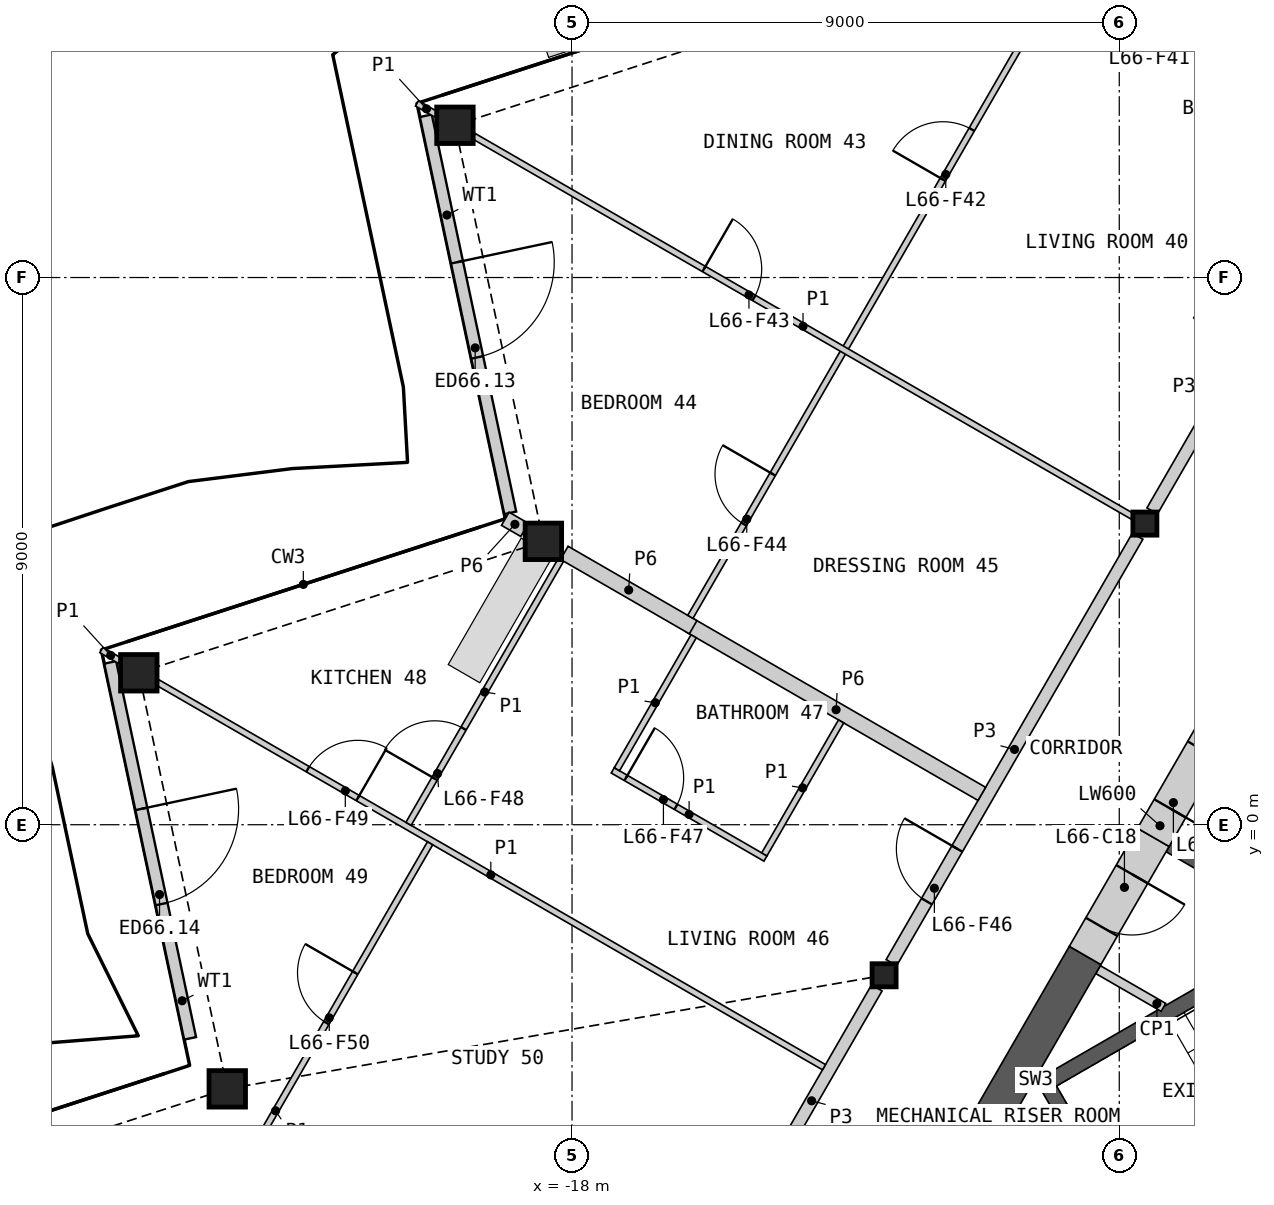
"""IFC4 building model, lengths in metres.
Left out: names, types, materials, properties, quantities, classifications, styles, units other than length and angle.
Written with IfcOpenShell. Run it as: python <this file> out.ifc"""

import sys

from ifc_helpers import new_model, si_unit, direction, frame, frame_2d, origin, origin_2d, place, context, subcontext, project, spatial, polyline, rectangle, hollow_rectangle, i_section, outline, extrude, element, fill, save


model = new_model("IFC4")
c1 = context("Model", 3, precision=1e-05, world=origin(), true_north=direction((0.0, 1.0)))
c2 = subcontext(c1, "Body", "Model", "MODEL_VIEW")
j1 = project(units=[si_unit("LENGTHUNIT", "METRE"), si_unit("PLANEANGLEUNIT", "RADIAN")], contexts=[c1])
p1 = place(None, origin())
s1 = spatial("IfcSite", under=j1, at=p1, CompositionType="ELEMENT")
p2 = place(p1, origin())
s2 = spatial("IfcBuilding", under=s1, at=p2, CompositionType="ELEMENT")
p3 = place(p2, frame((0.0, 0.0, 305.2)))
s3 = spatial("IfcBuildingStorey", under=s2, at=p3, CompositionType="ELEMENT", Elevation=305.2)
for number, where, z_axis, x_axis in (
    (1, (-19.926, 11.504, 0.0), (0.0, 0.0, 1.0), (1.0, 0.0, 0.0)),
    (2, (-18.471, 4.661, 0.0), (0.0, 0.0, 1.0), (1.0, 0.0, 0.0)),
    (3, (-25.125, 2.499, 0.0), (0.0, 0.0, 1.0), (1.0, 0.0, 0.0)),
    (4, (-23.67, -4.344, 0.0), (0.0, 0.0, 1.0), (1.0, 0.0, 0.0)),
):
    element("IfcColumn", number, at=place(p3, frame(where, z_axis=z_axis, x_axis=x_axis)), inside=s3, PredefinedType="COLUMN", context=c2, shape_type="SweptSolid", body=[
        extrude(hollow_rectangle(XDim=0.6, YDim=0.6, WallThickness=0.04, at=origin_2d()), origin(), (0.0, 0.0, 1.0), 3.4),
    ])
for number, where, z_axis, x_axis in (
    (5, (-8.578, 4.953, 0.0), (0.0, 0.0, 1.0), (1.0, 0.0, 0.0)),
    (6, (-12.868, -2.476, 0.0), (0.0, 0.0, 1.0), (1.0, 0.0, 0.0)),
):
    element("IfcColumn", number, at=place(p3, frame(where, z_axis=z_axis, x_axis=x_axis)), inside=s3, PredefinedType="COLUMN", context=c2, shape_type="SweptSolid", body=[
        extrude(i_section(OverallWidth=0.396, OverallDepth=0.381, WebThickness=0.019, FlangeThickness=0.03, at=origin_2d()), origin(), (0.0, 0.0, 1.0), 3.4),
    ])
p4 = place(p3, frame((-20.404, 11.661, 0.0), z_axis=(0.0, 0.0, 1.0), x_axis=(0.207893301034, -0.978151509422, 0.0)))
e7 = element("IfcWall", 7, at=p4, inside=s3, PredefinedType="SOLIDWALL", context=c2, shape_type="SweptSolid", body=[
    extrude(rectangle(XDim=6.677, YDim=0.2, at=frame_2d((3.339, 0.0))), origin(), (0.0, 0.0, 1.0), 2.488),
])
p5 = place(p4, frame((2.463, 0.0, 0.0)))
e8 = element("IfcOpeningElement", 8, at=p5, cuts=e7, PredefinedType="OPENING", context=c2, shape_type="SweptSolid", body=[
    extrude(rectangle(XDim=1.6, YDim=2.25, at=frame_2d((0.8, 1.125))), frame((0.0, 0.11, 0.0), z_axis=(0.0, -1.0, 0.0), x_axis=(1.0, 0.0, 0.0)), (0.0, 0.0, 1.0), 0.22),
])
p6 = place(p3, frame((-25.595, 2.67, 0.0), z_axis=(0.0, 0.0, 1.0), x_axis=(0.207888316408, -0.978152568826, 0.0)))
e9 = element("IfcWall", 9, at=p6, inside=s3, PredefinedType="SOLIDWALL", context=c2, shape_type="SweptSolid", body=[
    extrude(rectangle(XDim=6.322, YDim=0.2, at=frame_2d((3.161, 0.0))), origin(), (0.0, 0.0, 1.0), 2.488),
])
p7 = place(p6, frame((2.463, 0.0, 0.0)))
e10 = element("IfcOpeningElement", 10, at=p7, cuts=e9, PredefinedType="OPENING", context=c2, shape_type="SweptSolid", body=[
    extrude(rectangle(XDim=1.6, YDim=2.25, at=frame_2d((0.8, 1.125))), frame((0.0, 0.11, 0.0), z_axis=(0.0, -1.0, 0.0), x_axis=(1.0, 0.0, 0.0)), (0.0, 0.0, 1.0), 0.22),
])
p8 = place(p3, origin())
e11 = element("IfcWall", 11, at=p8, inside=s3, PredefinedType="SHEAR", context=c2, shape_type="SweptSolid", body=[
    extrude(outline(polyline([(-6.061, -1.697), (-8.231, -0.444), (-8.131, -0.271), (-5.96, -1.524), (-6.061, -1.697)])), origin(), (0.0, 0.0, 1.0), 3.1),
])
p9 = place(p3, origin())
e12 = element("IfcWall", 12, at=p9, inside=s3, PredefinedType="SHEAR", context=c2, shape_type="SweptSolid", body=[
    extrude(outline(polyline([(-5.307, -1.281), (-10.374, -4.206), (-10.032, -4.298), (-5.182, -1.498), (-5.307, -1.281)])), origin(), (0.0, 0.0, 1.0), 3.1),
])
p10 = place(p3, origin())
e13 = element("IfcWall", 13, at=p10, inside=s3, PredefinedType="SHEAR", context=c2, shape_type="SweptSolid", body=[
    extrude(outline(polyline([(-10.374, -4.206), (-8.83, -6.881), (-8.738, -6.539), (-10.032, -4.298), (-10.374, -4.206)])), origin(), (0.0, 0.0, 1.0), 3.1),
])
p11 = place(p3, origin())
e14 = element("IfcWall", 14, at=p11, inside=s3, PredefinedType="SHEAR", context=c2, shape_type="SweptSolid", body=[
    extrude(outline(polyline([(-8.738, -6.539), (-8.83, -6.881), (-3.763, -3.956), (-3.888, -3.739), (-8.738, -6.539)])), origin(), (0.0, 0.0, 1.0), 3.1),
])
p12 = place(p3, frame((-9.35, -2.383, 0.0), z_axis=(0.0, 0.0, 1.0), x_axis=(0.866057962423, -0.499943602543, 0.0)))
e15 = element("IfcWall", 15, at=p12, inside=s3, PredefinedType="PARTITIONING", context=c2, shape_type="SweptSolid", body=[
    extrude(rectangle(XDim=1.242, YDim=0.15, at=frame_2d((0.621, 0.0))), origin(), (0.0, 0.0, 1.0), 3.1),
])
p13 = place(p3, frame((-9.562, -2.15, 0.0), z_axis=(0.0, 0.0, 1.0), x_axis=(-0.500015214976, -0.866016619236, 0.0)))
e16 = element("IfcWall", 16, at=p13, inside=s3, PredefinedType="SHEAR", context=c2, shape_type="SweptSolid", body=[
    extrude(rectangle(XDim=5.318, YDim=0.6, at=frame_2d((2.659, 0.0))), origin(), (0.0, 0.0, 1.0), 3.1),
])
p14 = place(p3, frame((-8.44, -0.208, 0.0), z_axis=(0.0, 0.0, 1.0), x_axis=(-0.500001951578, -0.866024277037, 0.0)))
e17 = element("IfcWall", 17, at=p14, inside=s3, PredefinedType="SHEAR", context=c2, shape_type="SweptSolid", body=[
    extrude(rectangle(XDim=2.243, YDim=0.6, at=frame_2d((1.122, 0.0))), origin(), (0.0, 0.0, 1.0), 3.1),
])
p15 = place(p14, frame((0.7, 0.0, 0.0)))
e18 = element("IfcOpeningElement", 18, at=p15, cuts=e17, PredefinedType="OPENING", context=c2, shape_type="SweptSolid", body=[
    extrude(rectangle(XDim=1.0, YDim=2.1, at=frame_2d((0.5, 1.05))), frame((0.0, 0.31, 0.0), z_axis=(0.0, -1.0, 0.0), x_axis=(1.0, 0.0, 0.0)), (0.0, 0.0, 1.0), 0.62),
])
p16 = place(p3, frame((-7.34, 1.698, 0.0), z_axis=(0.0, 0.0, 1.0), x_axis=(-0.50002983664, -0.866008176907, 0.0)))
e19 = element("IfcWall", 19, at=p16, inside=s3, PredefinedType="SHEAR", context=c2, shape_type="SweptSolid", body=[
    extrude(rectangle(XDim=2.2, YDim=0.6, at=frame_2d((1.1, 0.0))), origin(), (0.0, 0.0, 1.0), 3.1),
])
p17 = place(p16, frame((0.55, 0.0, 0.0)))
e20 = element("IfcOpeningElement", 20, at=p17, cuts=e19, PredefinedType="OPENING", context=c2, shape_type="SweptSolid", body=[
    extrude(rectangle(XDim=1.1, YDim=2.1, at=frame_2d((0.55, 1.05))), frame((0.0, 0.31, 0.0), z_axis=(0.0, -1.0, 0.0), x_axis=(1.0, 0.0, 0.0)), (0.0, 0.0, 1.0), 0.62),
])
p18 = place(p3, frame((-8.458, 5.16, 0.0), z_axis=(0.0, 0.0, 1.0), x_axis=(0.499984266882, 0.866034487114, 0.0)))
e21 = element("IfcWall", 21, at=p18, inside=s3, PredefinedType="PARTITIONING", context=c2, shape_type="SweptSolid", body=[
    extrude(rectangle(XDim=8.099, YDim=0.2, at=frame_2d((4.049, 0.0))), origin(), (0.0, 0.0, 1.0), 3.1),
])
p19 = place(p18, frame((3.093, 0.0, 0.0)))
e22 = element("IfcOpeningElement", 22, at=p19, cuts=e21, PredefinedType="OPENING", context=c2, shape_type="SweptSolid", body=[
    extrude(rectangle(XDim=1.0, YDim=2.1, at=frame_2d((0.5, 1.05))), frame((0.0, 0.11, 0.0), z_axis=(0.0, -1.0, 0.0), x_axis=(1.0, 0.0, 0.0)), (0.0, 0.0, 1.0), 0.22),
])
p20 = place(p3, frame((-12.748, -2.269, 0.0), z_axis=(0.0, 0.0, 1.0), x_axis=(0.499984266882, 0.866034487114, 0.0)))
e23 = element("IfcWall", 23, at=p20, inside=s3, PredefinedType="PARTITIONING", context=c2, shape_type="SweptSolid", body=[
    extrude(rectangle(XDim=8.099, YDim=0.2, at=frame_2d((4.049, 0.0))), origin(), (0.0, 0.0, 1.0), 3.1),
])
p21 = place(p20, frame((1.164, 0.0, 0.0)))
e24 = element("IfcOpeningElement", 24, at=p21, cuts=e23, PredefinedType="OPENING", context=c2, shape_type="SweptSolid", body=[
    extrude(rectangle(XDim=1.0, YDim=2.1, at=frame_2d((0.5, 1.05))), frame((0.0, 0.11, 0.0), z_axis=(0.0, -1.0, 0.0), x_axis=(1.0, 0.0, 0.0)), (0.0, 0.0, 1.0), 0.22),
])
p22 = place(p3, frame((-16.054, 3.275, 0.0), z_axis=(0.0, 0.0, 1.0), x_axis=(0.866019581949, -0.500010083578, 0.0)))
e25 = element("IfcWall", 25, at=p22, inside=s3, PredefinedType="PARTITIONING", context=c2, shape_type="SweptSolid", body=[
    extrude(rectangle(XDim=5.535, YDim=0.25, at=frame_2d((2.768, 0.0))), origin(), (0.0, 0.0, 1.0), 2.33),
])
p23 = place(p3, frame((-15.131, -6.397, 0.0), z_axis=(0.0, 0.0, 1.0), x_axis=(0.500003406062, 0.866023437285, 0.0)))
e26 = element("IfcWall", 26, at=p23, inside=s3, PredefinedType="PARTITIONING", context=c2, shape_type="SweptSolid", body=[
    extrude(rectangle(XDim=4.288, YDim=0.2, at=frame_2d((2.144, 0.0))), origin(), (0.0, 0.0, 1.0), 3.1),
])
p24 = place(p3, frame((-18.127, 4.472, 0.0), z_axis=(0.0, 0.0, 1.0), x_axis=(0.866017755388, -0.500013247177, 0.0)))
e27 = element("IfcWall", 27, at=p24, inside=s3, PredefinedType="PARTITIONING", context=c2, shape_type="SweptSolid", body=[
    extrude(rectangle(XDim=2.447, YDim=0.25, at=frame_2d((1.223, 0.0))), origin(), (0.0, 0.0, 1.0), 2.33),
])
p25 = place(p3, frame((-19.097, 5.032, 0.0), z_axis=(0.0, 0.0, 1.0), x_axis=(0.86609656662, -0.499876722092, 0.0)))
e28 = element("IfcWall", 28, at=p25, inside=s3, PredefinedType="PARTITIONING", context=c2, shape_type="SweptSolid", body=[
    extrude(rectangle(XDim=0.365, YDim=0.25, at=frame_2d((0.183, 0.0))), origin(), (0.0, 0.0, 1.0), 2.33),
])
p26 = place(p3, frame((-16.054, 3.419, 0.0), z_axis=(0.0, 0.0, 1.0), x_axis=(0.499999256795, 0.866025832873, 0.0)))
e29 = element("IfcWall", 29, at=p26, inside=s3, PredefinedType="PARTITIONING", context=c2, shape_type="SweptSolid", body=[
    extrude(rectangle(XDim=15.448, YDim=0.1, at=frame_2d((7.724, 0.0))), origin(), (0.0, 0.0, 1.0), 2.33),
])
p27 = place(p26, frame((8.306, 0.0, 0.0)))
e30 = element("IfcOpeningElement", 30, at=p27, cuts=e29, PredefinedType="OPENING", context=c2, shape_type="SweptSolid", body=[
    extrude(rectangle(XDim=0.95, YDim=2.1, at=frame_2d((0.475, 1.05))), frame((0.0, 0.06, 0.0), z_axis=(0.0, -1.0, 0.0), x_axis=(1.0, 0.0, 0.0)), (0.0, 0.0, 1.0), 0.12),
])
p28 = place(p26, frame((1.76, 0.0, 0.0)))
e31 = element("IfcOpeningElement", 31, at=p28, cuts=e29, PredefinedType="OPENING", context=c2, shape_type="SweptSolid", body=[
    extrude(rectangle(XDim=0.95, YDim=2.1, at=frame_2d((0.475, 1.05))), frame((0.0, 0.06, 0.0), z_axis=(0.0, -1.0, 0.0), x_axis=(1.0, 0.0, 0.0)), (0.0, 0.0, 1.0), 0.12),
])
p29 = place(p3, frame((-24.815, 2.339, 0.0), z_axis=(0.0, 0.0, 1.0), x_axis=(0.866021406514, -0.500006923412, 0.0)))
e32 = element("IfcWall", 32, at=p29, inside=s3, PredefinedType="PARTITIONING", context=c2, shape_type="SweptSolid", body=[
    extrude(rectangle(XDim=12.654, YDim=0.1, at=frame_2d((6.327, 0.0))), origin(), (0.0, 0.0, 1.0), 2.33),
])
p30 = place(p29, frame((2.851, 0.0, 0.0)))
e33 = element("IfcOpeningElement", 33, at=p30, cuts=e32, PredefinedType="OPENING", context=c2, shape_type="SweptSolid", body=[
    extrude(rectangle(XDim=0.95, YDim=2.1, at=frame_2d((0.475, 1.05))), frame((0.0, 0.06, 0.0), z_axis=(0.0, -1.0, 0.0), x_axis=(1.0, 0.0, 0.0)), (0.0, 0.0, 1.0), 0.12),
])
p31 = place(p3, frame((-19.615, 11.325, 0.0), z_axis=(0.0, 0.0, 1.0), x_axis=(0.86602139559, -0.500006942333, 0.0)))
e34 = element("IfcWall", 34, at=p31, inside=s3, PredefinedType="PARTITIONING", context=c2, shape_type="SweptSolid", body=[
    extrude(rectangle(XDim=12.505, YDim=0.1, at=frame_2d((6.252, 0.0))), origin(), (0.0, 0.0, 1.0), 2.33),
])
p32 = place(p31, frame((4.37, 0.0, 0.0)))
e35 = element("IfcOpeningElement", 35, at=p32, cuts=e34, PredefinedType="OPENING", context=c2, shape_type="SweptSolid", body=[
    extrude(rectangle(XDim=0.95, YDim=2.1, at=frame_2d((0.475, 1.05))), frame((0.0, 0.06, 0.0), z_axis=(0.0, -1.0, 0.0), x_axis=(1.0, 0.0, 0.0)), (0.0, 0.0, 1.0), 0.12),
])
p33 = place(p3, frame((-23.722, -6.172, 0.0), z_axis=(0.0, 0.0, 1.0), x_axis=(0.499991774685, 0.86603015262, 0.0)))
e36 = element("IfcWall", 36, at=p33, inside=s3, PredefinedType="PARTITIONING", context=c2, shape_type="SweptSolid", body=[
    extrude(rectangle(XDim=6.774, YDim=0.1, at=frame_2d((3.387, 0.0))), origin(), (0.0, 0.0, 1.0), 2.33),
])
p34 = place(p33, frame((3.364, 0.0, 0.0)))
e37 = element("IfcOpeningElement", 37, at=p34, cuts=e36, PredefinedType="OPENING", context=c2, shape_type="SweptSolid", body=[
    extrude(rectangle(XDim=0.95, YDim=2.1, at=frame_2d((0.475, 1.05))), frame((0.0, 0.06, 0.0), z_axis=(0.0, -1.0, 0.0), x_axis=(1.0, 0.0, 0.0)), (0.0, 0.0, 1.0), 0.12),
])
p35 = place(p3, frame((-9.787, 14.174, 0.0), z_axis=(0.0, 0.0, 1.0), x_axis=(0.866031222068, -0.499989922303, 0.0)))
e38 = element("IfcWall", 38, at=p35, inside=s3, PredefinedType="PARTITIONING", context=c2, shape_type="SweptSolid", body=[
    extrude(rectangle(XDim=5.557, YDim=0.1, at=frame_2d((2.779, 0.0))), origin(), (0.0, 0.0, 1.0), 2.33),
])
p36 = place(p35, frame((1.853, 0.0, 0.0)))
e39 = element("IfcOpeningElement", 39, at=p36, cuts=e38, PredefinedType="OPENING", context=c2, shape_type="SweptSolid", body=[
    extrude(rectangle(XDim=0.95, YDim=2.1, at=frame_2d((0.475, 1.05))), frame((0.0, 0.06, 0.0), z_axis=(0.0, -1.0, 0.0), x_axis=(1.0, 0.0, 0.0)), (0.0, 0.0, 1.0), 0.12),
])
p37 = place(p3, frame((-20.689, 0.014, 0.0), z_axis=(0.0, 0.0, 1.0), x_axis=(0.500003822013, 0.866023197133, 0.0)))
e40 = element("IfcWall", 40, at=p37, inside=s3, PredefinedType="PARTITIONING", context=c2, shape_type="SweptSolid", body=[
    extrude(rectangle(XDim=5.007, YDim=0.1, at=frame_2d((2.504, 0.0))), origin(), (0.0, 0.0, 1.0), 2.33),
])
p38 = place(p37, frame((0.86, 0.0, 0.0)))
e41 = element("IfcOpeningElement", 41, at=p38, cuts=e40, PredefinedType="OPENING", context=c2, shape_type="SweptSolid", body=[
    extrude(rectangle(XDim=0.95, YDim=2.1, at=frame_2d((0.475, 1.05))), frame((0.0, 0.06, 0.0), z_axis=(0.0, -1.0, 0.0), x_axis=(1.0, 0.0, 0.0)), (0.0, 0.0, 1.0), 0.12),
])
p39 = place(p3, frame((-17.33, 0.894, 0.0), z_axis=(0.0, 0.0, 1.0), x_axis=(0.866032775405, -0.499987231761, 0.0)))
e42 = element("IfcWall", 42, at=p39, inside=s3, PredefinedType="PARTITIONING", context=c2, shape_type="SweptSolid", body=[
    extrude(rectangle(XDim=2.9, YDim=0.1, at=frame_2d((1.45, 0.0))), origin(), (0.0, 0.0, 1.0), 2.33),
])
p40 = place(p39, frame((0.25, 0.0, 0.0)))
e43 = element("IfcOpeningElement", 43, at=p40, cuts=e42, PredefinedType="OPENING", context=c2, shape_type="SweptSolid", body=[
    extrude(rectangle(XDim=0.95, YDim=2.1, at=frame_2d((0.475, 1.05))), frame((0.0, 0.06, 0.0), z_axis=(0.0, -1.0, 0.0), x_axis=(1.0, 0.0, 0.0)), (0.0, 0.0, 1.0), 0.12),
])
p41 = place(p3, frame((-14.837, -0.488, 0.0), z_axis=(0.0, 0.0, 1.0), x_axis=(0.499976333282, 0.866039067339, 0.0)))
e44 = element("IfcWall", 44, at=p41, inside=s3, PredefinedType="PARTITIONING", context=c2, shape_type="SweptSolid", body=[
    extrude(rectangle(XDim=2.525, YDim=0.1, at=frame_2d((1.262, 0.0))), origin(), (0.0, 0.0, 1.0), 2.33),
])
p42 = place(p3, frame((-17.262, 0.912, 0.0), z_axis=(0.0, 0.0, 1.0), x_axis=(0.500048846702, 0.865997200291, 0.0)))
e45 = element("IfcWall", 45, at=p42, inside=s3, PredefinedType="PARTITIONING", context=c2, shape_type="SweptSolid", body=[
    extrude(rectangle(XDim=2.525, YDim=0.1, at=frame_2d((1.263, 0.0))), origin(), (0.0, 0.0, 1.0), 2.33),
])
p43 = place(p3, frame((-20.55, 11.865, 0.0), z_axis=(0.0, 0.0, 1.0), x_axis=(0.866039913117, -0.499974868256, 0.0)))
e46 = element("IfcWall", 46, at=p43, inside=s3, PredefinedType="PARTITIONING", context=c2, shape_type="SweptSolid", body=[
    extrude(rectangle(XDim=0.363, YDim=0.1, at=frame_2d((0.181, 0.0))), origin(), (0.0, 0.0, 1.0), 2.33),
])
p44 = place(p3, frame((-25.741, 2.874, 0.0), z_axis=(0.0, 0.0, 1.0), x_axis=(0.865851769275, -0.500300623268, 0.0)))
e47 = element("IfcWall", 47, at=p44, inside=s3, PredefinedType="PARTITIONING", context=c2, shape_type="SweptSolid", body=[
    extrude(rectangle(XDim=0.353, YDim=0.1, at=frame_2d((0.177, 0.0))), origin(), (0.0, 0.0, 1.0), 2.33),
])
p45 = place(p5, origin())
e48 = element("IfcDoor", 48, at=p45, inside=s3, OperationType="DOUBLE_DOOR_SINGLE_SWING", PredefinedType="DOOR", context=c2, shape_type="SweptSolid", body=[
    extrude(rectangle(XDim=1.6, YDim=2.25, at=frame_2d((0.8, 1.125))), frame((0.0, 0.025, 0.0), z_axis=(0.0, -1.0, 0.0), x_axis=(1.0, 0.0, 0.0)), (0.0, 0.0, 1.0), 0.05),
])
fill(e8, e48)
p46 = place(p7, origin())
e49 = element("IfcDoor", 49, at=p46, inside=s3, OperationType="DOUBLE_DOOR_SINGLE_SWING", PredefinedType="DOOR", context=c2, shape_type="SweptSolid", body=[
    extrude(rectangle(XDim=1.6, YDim=2.25, at=frame_2d((0.8, 1.125))), frame((0.0, 0.025, 0.0), z_axis=(0.0, -1.0, 0.0), x_axis=(1.0, 0.0, 0.0)), (0.0, 0.0, 1.0), 0.05),
])
fill(e10, e49)
p47 = place(p15, origin())
e50 = element("IfcDoor", 50, at=p47, inside=s3, OperationType="SINGLE_SWING_LEFT", PredefinedType="DOOR", context=c2, shape_type="SweptSolid", body=[
    extrude(rectangle(XDim=1.0, YDim=2.1, at=frame_2d((0.5, 1.05))), frame((0.0, 0.055, 0.0), z_axis=(0.0, -1.0, 0.0), x_axis=(1.0, 0.0, 0.0)), (0.0, 0.0, 1.0), 0.05),
])
fill(e18, e50)
p48 = place(p17, origin())
e51 = element("IfcDoor", 51, at=p48, inside=s3, OperationType="SINGLE_SWING_RIGHT", PredefinedType="DOOR", context=c2, shape_type="SweptSolid", body=[
    extrude(rectangle(XDim=1.1, YDim=2.1, at=frame_2d((0.55, 1.05))), frame((0.0, 0.055, 0.0), z_axis=(0.0, -1.0, 0.0), x_axis=(1.0, 0.0, 0.0)), (0.0, 0.0, 1.0), 0.05),
])
fill(e20, e51)
p49 = place(p27, origin())
e52 = element("IfcDoor", 52, at=p49, inside=s3, OperationType="SINGLE_SWING_LEFT", PredefinedType="DOOR", context=c2, shape_type="SweptSolid", body=[
    extrude(rectangle(XDim=0.95, YDim=2.1, at=frame_2d((0.475, 1.05))), frame((0.0, 0.025, 0.0), z_axis=(0.0, -1.0, 0.0), x_axis=(1.0, 0.0, 0.0)), (0.0, 0.0, 1.0), 0.05),
])
fill(e30, e52)
p50 = place(p32, origin())
e53 = element("IfcDoor", 53, at=p50, inside=s3, OperationType="SINGLE_SWING_LEFT", PredefinedType="DOOR", context=c2, shape_type="SweptSolid", body=[
    extrude(rectangle(XDim=0.95, YDim=2.1, at=frame_2d((0.475, 1.05))), frame((0.0, 0.025, 0.0), z_axis=(0.0, -1.0, 0.0), x_axis=(1.0, 0.0, 0.0)), (0.0, 0.0, 1.0), 0.05),
])
fill(e35, e53)
p51 = place(p28, origin())
e54 = element("IfcDoor", 54, at=p51, inside=s3, OperationType="SINGLE_SWING_RIGHT", PredefinedType="DOOR", context=c2, shape_type="SweptSolid", body=[
    extrude(rectangle(XDim=0.95, YDim=2.1, at=frame_2d((0.475, 1.05))), frame((0.0, 0.025, 0.0), z_axis=(0.0, -1.0, 0.0), x_axis=(1.0, 0.0, 0.0)), (0.0, 0.0, 1.0), 0.05),
])
fill(e31, e54)
p52 = place(p21, origin())
e55 = element("IfcDoor", 55, at=p52, inside=s3, OperationType="SINGLE_SWING_RIGHT", PredefinedType="DOOR", context=c2, shape_type="SweptSolid", body=[
    extrude(rectangle(XDim=1.0, YDim=2.1, at=frame_2d((0.5, 1.05))), frame((0.0, 0.025, 0.0), z_axis=(0.0, -1.0, 0.0), x_axis=(1.0, 0.0, 0.0)), (0.0, 0.0, 1.0), 0.05),
])
fill(e24, e55)
p53 = place(p40, origin())
e56 = element("IfcDoor", 56, at=p53, inside=s3, OperationType="SINGLE_SWING_LEFT", PredefinedType="DOOR", context=c2, shape_type="SweptSolid", body=[
    extrude(rectangle(XDim=0.95, YDim=2.1, at=frame_2d((0.475, 1.05))), frame((0.0, 0.025, 0.0), z_axis=(0.0, -1.0, 0.0), x_axis=(1.0, 0.0, 0.0)), (0.0, 0.0, 1.0), 0.05),
])
fill(e43, e56)
p54 = place(p38, origin())
e57 = element("IfcDoor", 57, at=p54, inside=s3, OperationType="SINGLE_SWING_LEFT", PredefinedType="DOOR", context=c2, shape_type="SweptSolid", body=[
    extrude(rectangle(XDim=0.95, YDim=2.1, at=frame_2d((0.475, 1.05))), frame((0.0, 0.025, 0.0), z_axis=(0.0, -1.0, 0.0), x_axis=(1.0, 0.0, 0.0)), (0.0, 0.0, 1.0), 0.05),
])
fill(e41, e57)
p55 = place(p30, origin())
e58 = element("IfcDoor", 58, at=p55, inside=s3, OperationType="SINGLE_SWING_RIGHT", PredefinedType="DOOR", context=c2, shape_type="SweptSolid", body=[
    extrude(rectangle(XDim=0.95, YDim=2.1, at=frame_2d((0.475, 1.05))), frame((0.0, 0.025, 0.0), z_axis=(0.0, -1.0, 0.0), x_axis=(1.0, 0.0, 0.0)), (0.0, 0.0, 1.0), 0.05),
])
fill(e33, e58)
p56 = place(p34, origin())
e59 = element("IfcDoor", 59, at=p56, inside=s3, OperationType="SINGLE_SWING_RIGHT", PredefinedType="DOOR", context=c2, shape_type="SweptSolid", body=[
    extrude(rectangle(XDim=0.95, YDim=2.1, at=frame_2d((0.475, 1.05))), frame((0.0, 0.025, 0.0), z_axis=(0.0, -1.0, 0.0), x_axis=(1.0, 0.0, 0.0)), (0.0, 0.0, 1.0), 0.05),
])
fill(e37, e59)
save(model, sys.argv[1])
